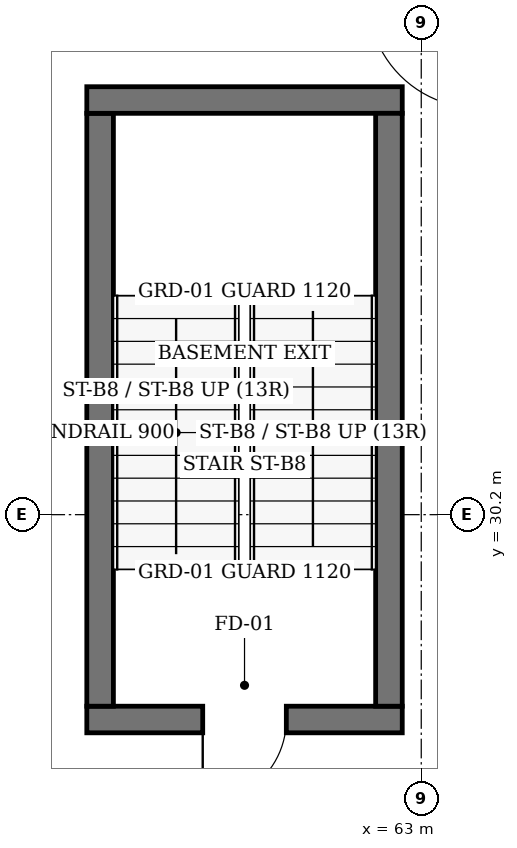
"""IFC4 building model, lengths in metres.
Left out: names, types, materials, properties, quantities, classifications, styles, units other than length and angle.
Written with IfcOpenShell. Run it as: python <this file> out.ifc"""

import sys

from ifc_helpers import new_model, si_unit, direction, frame, frame_2d, origin, place, context, subcontext, project, spatial, rectangle, extrude, element, fill, save


model = new_model("IFC4")
c1 = context("Model", 3, precision=1e-05, world=origin(), true_north=direction((0.0, 1.0)))
c2 = subcontext(c1, "Body", "Model", "MODEL_VIEW")
j1 = project(units=[si_unit("LENGTHUNIT", "METRE"), si_unit("PLANEANGLEUNIT", "RADIAN")], contexts=[c1])
p1 = place(None, origin())
s1 = spatial("IfcSite", under=j1, at=p1, CompositionType="ELEMENT")
p2 = place(p1, origin())
s2 = spatial("IfcBuilding", under=s1, at=p2, CompositionType="ELEMENT")
p3 = place(p2, frame((0.0, 0.0, -4.8)))
s3 = spatial("IfcBuildingStorey", under=s2, at=p3, CompositionType="ELEMENT", Elevation=-4.8)
p4 = place(p3, frame((62.75, 27.505, 0.0), z_axis=(0.0, 0.0, 1.0), x_axis=(-1.0, 0.0, 0.0)))
e1 = element("IfcWall", 1, at=p4, inside=s3, PredefinedType="SOLIDWALL", context=c2, shape_type="SweptSolid", body=[
    extrude(rectangle(XDim=4.15, YDim=0.35, at=frame_2d((2.075, 0.0))), origin(), (0.0, 0.0, 1.0), 4.56),
])
p5 = place(p4, frame((1.525, 0.0, 0.0)))
e2 = element("IfcOpeningElement", 2, at=p5, cuts=e1, PredefinedType="OPENING", context=c2, shape_type="SweptSolid", body=[
    extrude(rectangle(XDim=1.1, YDim=2.15, at=frame_2d((0.55, 1.075))), frame((0.0, 0.195, 0.0), z_axis=(0.0, -1.0, 0.0), x_axis=(1.0, 0.0, 0.0)), (0.0, 0.0, 1.0), 0.39),
])
p6 = place(p3, frame((58.775, 27.68, 0.0), z_axis=(0.0, 0.0, 1.0), x_axis=(0.0, 1.0, 0.0)))
e3 = element("IfcWall", 3, at=p6, inside=s3, PredefinedType="SOLIDWALL", context=c2, shape_type="SweptSolid", body=[
    extrude(rectangle(XDim=7.8, YDim=0.35, at=frame_2d((3.9, 0.0))), origin(), (0.0, 0.0, 1.0), 4.56),
])
p7 = place(p3, frame((58.6, 35.655, 0.0), z_axis=(0.0, 0.0, 1.0), x_axis=(1.0, 0.0, 0.0)))
e4 = element("IfcWall", 4, at=p7, inside=s3, PredefinedType="SOLIDWALL", context=c2, shape_type="SweptSolid", body=[
    extrude(rectangle(XDim=4.15, YDim=0.35, at=frame_2d((2.075, 0.0))), origin(), (0.0, 0.0, 1.0), 4.56),
])
p8 = place(p3, frame((62.575, 35.48, 0.0), z_axis=(0.0, 0.0, 1.0), x_axis=(0.0, -1.0, 0.0)))
e5 = element("IfcWall", 5, at=p8, inside=s3, PredefinedType="SOLIDWALL", context=c2, shape_type="SweptSolid", body=[
    extrude(rectangle(XDim=7.8, YDim=0.35, at=frame_2d((3.9, 0.0))), origin(), (0.0, 0.0, 1.0), 4.56),
])
p9 = place(p5, origin())
e6 = element("IfcDoor", 6, at=p9, inside=s3, OperationType="SINGLE_SWING_RIGHT", PredefinedType="DOOR", context=c2, shape_type="SweptSolid", body=[
    extrude(rectangle(XDim=1.1, YDim=2.15, at=frame_2d((0.55, 1.075))), frame((0.0, 0.025, 0.0), z_axis=(0.0, -1.0, 0.0), x_axis=(1.0, 0.0, 0.0)), (0.0, 0.0, 1.0), 0.05),
])
fill(e2, e6)
save(model, sys.argv[1])
